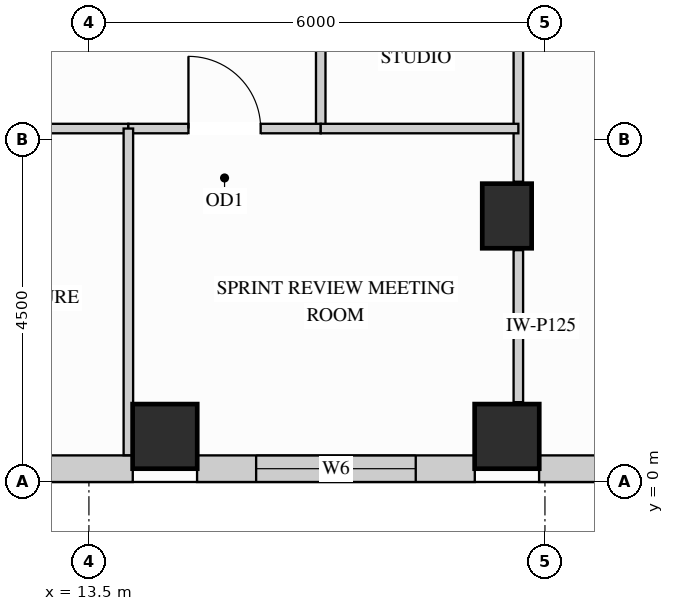
"""IFC4 building model, lengths in metres.
Left out: names, types, materials, properties, quantities, classifications, styles, units other than length and angle.
Written with IfcOpenShell. Run it as: python <this file> out.ifc"""

import sys

from ifc_helpers import new_model, si_unit, direction, frame, frame_2d, origin, origin_2d, place, context, subcontext, project, spatial, rectangle, extrude, source, transform, mapped, element, fill, save


model = new_model("IFC4")
c1 = context("Model", 3, precision=1e-05, world=origin(), true_north=direction((0.0, 1.0)))
c2 = subcontext(c1, "Body", "Model", "MODEL_VIEW")
j1 = project(units=[si_unit("LENGTHUNIT", "METRE"), si_unit("PLANEANGLEUNIT", "RADIAN")], contexts=[c1])
p1 = place(None, origin())
s1 = spatial("IfcSite", under=j1, at=p1, CompositionType="ELEMENT")
p2 = place(p1, origin())
s2 = spatial("IfcBuilding", under=s1, at=p2, CompositionType="ELEMENT")
p3 = place(p2, frame((0.0, 0.0, 255.6)))
s3 = spatial("IfcBuildingStorey", under=s2, at=p3, CompositionType="ELEMENT", Elevation=255.6)
m1 = source(origin(), c2, "Body", "SweptSolid", [
    extrude(rectangle(XDim=0.65, YDim=0.85, at=origin_2d()), origin(), (0.0, 0.0, 1.0), 3.4),
])
p4 = place(p3, frame((19.0, 3.5, 0.0), z_axis=(0.0, 0.0, 1.0), x_axis=(1.0, 0.0, 0.0)))
e1 = element("IfcColumn", 1, at=p4, inside=s3, PredefinedType="COLUMN", context=c2, shape_type="MappedRepresentation", body=[
    mapped(m1, transform((0.0, 0.0, 0.0), x_axis=(1.0, 0.0, 0.0), y_axis=(0.0, 1.0, 0.0), z_axis=(0.0, 0.0, 1.0))),
])
m2 = source(origin(), c2, "Body", "SweptSolid", [
    extrude(rectangle(XDim=0.85, YDim=0.85, at=origin_2d()), origin(), (0.0, 0.0, 1.0), 3.4),
])
for number, where, z_axis, x_axis in (
    (2, (14.5, 0.6, 0.0), (0.0, 0.0, 1.0), (1.0, 0.0, 0.0)),
    (3, (19.0, 0.6, 0.0), (0.0, 0.0, 1.0), (1.0, 0.0, 0.0)),
):
    element("IfcColumn", number, at=place(p3, frame(where, z_axis=z_axis, x_axis=x_axis)), inside=s3, PredefinedType="COLUMN", context=c2, shape_type="MappedRepresentation", body=[
        mapped(m2, transform((0.0, 0.0, 0.0), x_axis=(1.0, 0.0, 0.0), y_axis=(0.0, 1.0, 0.0), z_axis=(0.0, 0.0, 1.0))),
    ])
p5 = place(p3, frame((9.423, 0.175, 0.0), z_axis=(0.0, 0.0, 1.0), x_axis=(1.0, 0.0, 0.0)))
e4 = element("IfcWall", 4, at=p5, inside=s3, PredefinedType="SOLIDWALL", context=c2, shape_type="SweptSolid", body=[
    extrude(rectangle(XDim=4.654, YDim=0.35, at=frame_2d((2.327, 0.0))), origin(), (0.0, 0.0, 1.0), 3.385),
])
p6 = place(p5, frame((1.277, 0.0, 0.78)))
e5 = element("IfcOpeningElement", 5, at=p6, cuts=e4, PredefinedType="OPENING", context=c2, shape_type="SweptSolid", body=[
    extrude(rectangle(XDim=2.1, YDim=2.25, at=frame_2d((1.05, 1.125))), frame((0.0, 0.185, 0.0), z_axis=(0.0, -1.0, 0.0), x_axis=(1.0, 0.0, 0.0)), (0.0, 0.0, 1.0), 0.37),
])
p7 = place(p3, frame((14.923, 0.175, 0.0), z_axis=(0.0, 0.0, 1.0), x_axis=(1.0, 0.0, 0.0)))
e6 = element("IfcWall", 6, at=p7, inside=s3, PredefinedType="SOLIDWALL", context=c2, shape_type="SweptSolid", body=[
    extrude(rectangle(XDim=3.654, YDim=0.35, at=frame_2d((1.827, 0.0))), origin(), (0.0, 0.0, 1.0), 3.385),
])
p8 = place(p7, frame((0.777, 0.0, 0.78)))
e7 = element("IfcOpeningElement", 7, at=p8, cuts=e6, PredefinedType="OPENING", context=c2, shape_type="SweptSolid", body=[
    extrude(rectangle(XDim=2.1, YDim=2.25, at=frame_2d((1.05, 1.125))), frame((0.0, 0.185, 0.0), z_axis=(0.0, -1.0, 0.0), x_axis=(1.0, 0.0, 0.0)), (0.0, 0.0, 1.0), 0.37),
])
p9 = place(p3, frame((19.423, 0.175, 0.0), z_axis=(0.0, 0.0, 1.0), x_axis=(1.0, 0.0, 0.0)))
e8 = element("IfcWall", 8, at=p9, inside=s3, PredefinedType="SOLIDWALL", context=c2, shape_type="SweptSolid", body=[
    extrude(rectangle(XDim=3.554, YDim=0.35, at=frame_2d((1.777, 0.0))), origin(), (0.0, 0.0, 1.0), 3.385),
])
p10 = place(p9, frame((1.027, 0.0, 0.78)))
e9 = element("IfcOpeningElement", 9, at=p10, cuts=e8, PredefinedType="OPENING", context=c2, shape_type="SweptSolid", body=[
    extrude(rectangle(XDim=1.5, YDim=2.0, at=frame_2d((0.75, 1.0))), frame((0.0, 0.185, 0.0), z_axis=(0.0, -1.0, 0.0), x_axis=(1.0, 0.0, 0.0)), (0.0, 0.0, 1.0), 0.37),
])
m3 = source(origin(), c2, "Body", "SweptSolid", [
    extrude(rectangle(XDim=2.0, YDim=0.125, at=frame_2d((1.0, 0.0))), origin(), (0.0, 0.0, 1.0), 2.773),
])
p11 = place(p3, frame((19.15, 1.05, 0.0), z_axis=(0.0, 0.0, 1.0), x_axis=(0.0, 1.0, 0.0)))
e10 = element("IfcWall", 10, at=p11, inside=s3, PredefinedType="PARTITIONING", context=c2, shape_type="MappedRepresentation", body=[
    mapped(m3, transform((0.0, 0.0, 0.0), x_axis=(1.0, 0.0, 0.0), y_axis=(0.0, 1.0, 0.0), z_axis=(0.0, 0.0, 1.0))),
])
m4 = source(origin(), c2, "Body", "SweptSolid", [
    extrude(rectangle(XDim=4.1, YDim=0.125, at=frame_2d((2.05, 0.0))), origin(), (0.0, 0.0, 1.0), 2.773),
])
p12 = place(p3, frame((19.15, 3.95, 0.0), z_axis=(0.0, 0.0, 1.0), x_axis=(0.0, 1.0, 0.0)))
e11 = element("IfcWall", 11, at=p12, inside=s3, PredefinedType="PARTITIONING", context=c2, shape_type="MappedRepresentation", body=[
    mapped(m4, transform((0.0, 0.0, 0.0), x_axis=(1.0, 0.0, 0.0), y_axis=(0.0, 1.0, 0.0), z_axis=(0.0, 0.0, 1.0))),
])
p13 = place(p3, frame((16.55, 4.65, 0.0), z_axis=(0.0, 0.0, 1.0), x_axis=(0.0, 1.0, 0.0)))
e12 = element("IfcWall", 12, at=p13, inside=s3, PredefinedType="PARTITIONING", context=c2, shape_type="SweptSolid", body=[
    extrude(rectangle(XDim=5.95, YDim=0.125, at=frame_2d((2.975, 0.0))), origin(), (0.0, 0.0, 1.0), 3.385),
])
p14 = place(p13, frame((2.5, 0.0, 0.0)))
e13 = element("IfcOpeningElement", 13, at=p14, cuts=e12, PredefinedType="OPENING", context=c2, shape_type="SweptSolid", body=[
    extrude(rectangle(XDim=0.95, YDim=2.15, at=frame_2d((0.475, 1.075))), frame((0.0, 0.073, 0.0), z_axis=(0.0, -1.0, 0.0), x_axis=(1.0, 0.0, 0.0)), (0.0, 0.0, 1.0), 0.145),
])
p15 = place(p3, frame((8.227, 4.65, 0.0), z_axis=(0.0, 0.0, 1.0), x_axis=(1.0, 0.0, 0.0)))
e14 = element("IfcWall", 14, at=p15, inside=s3, PredefinedType="PARTITIONING", context=c2, shape_type="SweptSolid", body=[
    extrude(rectangle(XDim=5.792, YDim=0.125, at=frame_2d((2.896, 0.0))), origin(), (0.0, 0.0, 1.0), 2.848),
])
p16 = place(p15, frame((2.421, 0.0, 0.0)))
e15 = element("IfcOpeningElement", 15, at=p16, cuts=e14, PredefinedType="OPENING", context=c2, shape_type="SweptSolid", body=[
    extrude(rectangle(XDim=0.95, YDim=2.15, at=frame_2d((0.475, 1.075))), frame((0.0, 0.073, 0.0), z_axis=(0.0, -1.0, 0.0), x_axis=(1.0, 0.0, 0.0)), (0.0, 0.0, 1.0), 0.145),
])
p17 = place(p3, frame((14.019, 4.65, 0.0), z_axis=(0.0, 0.0, 1.0), x_axis=(1.0, 0.0, 0.0)))
e16 = element("IfcWall", 16, at=p17, inside=s3, PredefinedType="PARTITIONING", context=c2, shape_type="SweptSolid", body=[
    extrude(rectangle(XDim=2.531, YDim=0.125, at=frame_2d((1.266, 0.0))), origin(), (0.0, 0.0, 1.0), 2.848),
])
p18 = place(p17, frame((0.791, 0.0, 0.0)))
e17 = element("IfcOpeningElement", 17, at=p18, cuts=e16, PredefinedType="OPENING", context=c2, shape_type="SweptSolid", body=[
    extrude(rectangle(XDim=0.95, YDim=2.15, at=frame_2d((0.475, 1.075))), frame((0.0, 0.073, 0.0), z_axis=(0.0, -1.0, 0.0), x_axis=(1.0, 0.0, 0.0)), (0.0, 0.0, 1.0), 0.145),
])
m5 = source(origin(), c2, "Body", "SweptSolid", [
    extrude(rectangle(XDim=2.6, YDim=0.125, at=frame_2d((1.3, 0.0))), origin(), (0.0, 0.0, 1.0), 2.848),
])
p19 = place(p3, frame((16.55, 4.65, 0.0), z_axis=(0.0, 0.0, 1.0), x_axis=(1.0, 0.0, 0.0)))
e18 = element("IfcWall", 18, at=p19, inside=s3, PredefinedType="PARTITIONING", context=c2, shape_type="MappedRepresentation", body=[
    mapped(m5, transform((0.0, 0.0, 0.0), x_axis=(1.0, 0.0, 0.0), y_axis=(0.0, 1.0, 0.0), z_axis=(0.0, 0.0, 1.0))),
])
m6 = source(origin(), c2, "Body", "SweptSolid", [
    extrude(rectangle(XDim=4.298, YDim=0.125, at=frame_2d((2.149, 0.0))), origin(), (0.0, 0.0, 1.0), 3.385),
])
p20 = place(p3, frame((14.019, 0.352, 0.0), z_axis=(0.0, 0.0, 1.0), x_axis=(0.0, 1.0, 0.0)))
e19 = element("IfcWall", 19, at=p20, inside=s3, PredefinedType="PARTITIONING", context=c2, shape_type="MappedRepresentation", body=[
    mapped(m6, transform((0.0, 0.0, 0.0), x_axis=(1.0, 0.0, 0.0), y_axis=(0.0, 1.0, 0.0), z_axis=(0.0, 0.0, 1.0))),
])
m7 = source(origin(), c2, "Body", "SweptSolid", [
    extrude(rectangle(XDim=0.95, YDim=2.15, at=frame_2d((0.475, 1.075))), frame((0.0, 0.025, 0.0), z_axis=(0.0, -1.0, 0.0), x_axis=(1.0, 0.0, 0.0)), (0.0, 0.0, 1.0), 0.05),
])
p21 = place(p18, origin())
e20 = element("IfcDoor", 20, at=p21, inside=s3, OperationType="SINGLE_SWING_LEFT", PredefinedType="DOOR", context=c2, shape_type="MappedRepresentation", body=[
    mapped(m7, transform((0.0, 0.0, 0.0), x_axis=(1.0, 0.0, 0.0), y_axis=(0.0, 1.0, 0.0), z_axis=(0.0, 0.0, 1.0))),
])
fill(e17, e20)
m8 = source(origin(), c2, "Body", "SweptSolid", [
    extrude(rectangle(XDim=2.1, YDim=2.25, at=frame_2d((1.05, 1.125))), frame((0.0, 0.03, 0.0), z_axis=(0.0, -1.0, 0.0), x_axis=(1.0, 0.0, 0.0)), (0.0, 0.0, 1.0), 0.06),
])
p22 = place(p8, origin())
e21 = element("IfcWindow", 21, at=p22, inside=s3, PartitioningType="SINGLE_PANEL", PredefinedType="WINDOW", context=c2, shape_type="MappedRepresentation", body=[
    mapped(m8, transform((0.0, 0.0, 0.0), x_axis=(1.0, 0.0, 0.0), y_axis=(0.0, 1.0, 0.0), z_axis=(0.0, 0.0, 1.0))),
])
fill(e7, e21)
save(model, sys.argv[1])
